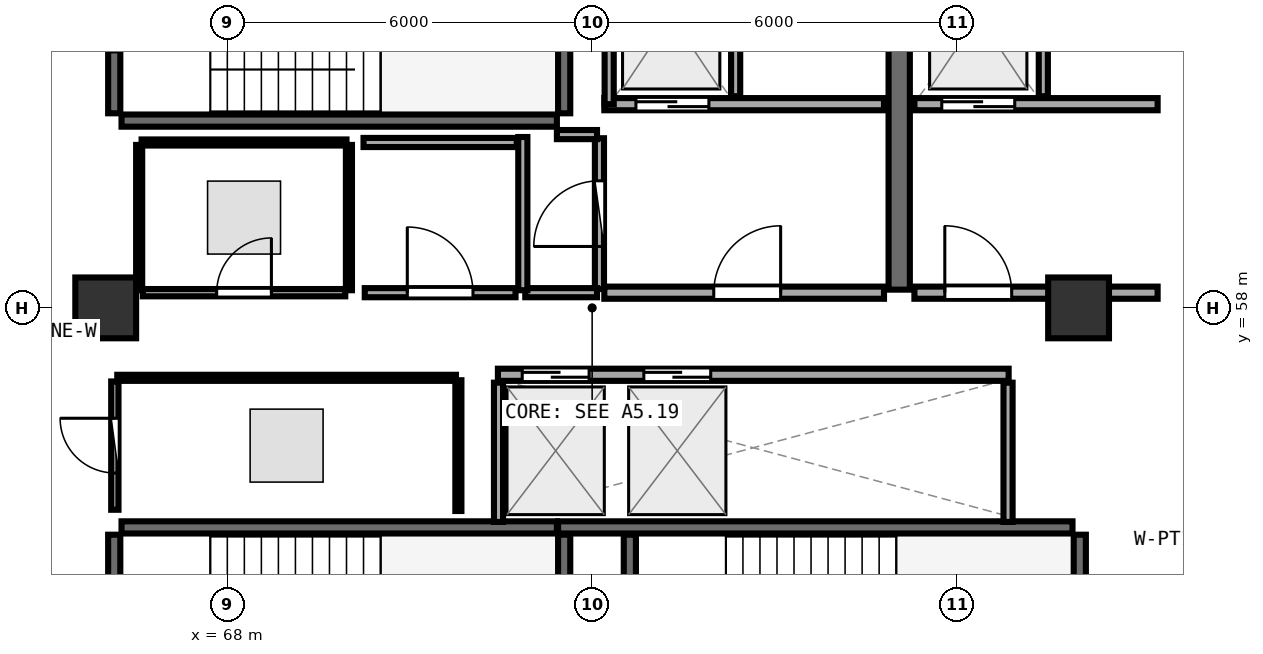
"""IFC4 building model, lengths in metres.
Left out: names, types, materials, properties, quantities, classifications, styles, units other than length and angle.
Written with IfcOpenShell. Run it as: python <this file> out.ifc"""

import sys

from ifc_helpers import new_model, si_unit, direction, frame, frame_2d, origin, origin_2d, place, context, subcontext, project, spatial, rectangle, extrude, element, fill, save


model = new_model("IFC4")
c1 = context("Model", 3, precision=1e-05, world=origin(), true_north=direction((0.0, 1.0)))
c2 = subcontext(c1, "Body", "Model", "MODEL_VIEW")
j1 = project(units=[si_unit("LENGTHUNIT", "METRE"), si_unit("PLANEANGLEUNIT", "RADIAN")], contexts=[c1])
p1 = place(None, origin())
s1 = spatial("IfcSite", under=j1, at=p1, CompositionType="ELEMENT")
p2 = place(p1, origin())
s2 = spatial("IfcBuilding", under=s1, at=p2, CompositionType="ELEMENT")
p3 = place(p2, frame((0.0, 0.0, 278.7)))
s3 = spatial("IfcBuildingStorey", under=s2, at=p3, CompositionType="ELEMENT", Elevation=278.7)
for number, where, z_axis, x_axis in (
    (1, (82.0, 58.0, 0.0), (0.0, 0.0, 1.0), (1.0, 0.0, 0.0)),
    (2, (66.0, 58.0, 0.0), (0.0, 0.0, 1.0), (1.0, 0.0, 0.0)),
):
    element("IfcColumn", number, at=place(p3, frame(where, z_axis=z_axis, x_axis=x_axis)), inside=s3, PredefinedType="PILASTER", context=c2, shape_type="SweptSolid", body=[
        extrude(rectangle(XDim=1.0, YDim=1.0, at=origin_2d()), origin(), (0.0, 0.0, 1.0), 3.75),
    ])
p4 = place(p3, frame((66.26, 61.08, 0.0), z_axis=(0.0, 0.0, 1.0), x_axis=(1.0, 0.0, 0.0)))
e3 = element("IfcWall", 3, at=p4, inside=s3, PredefinedType="SHEAR", context=c2, shape_type="SweptSolid", body=[
    extrude(rectangle(XDim=7.16, YDim=0.2, at=frame_2d((3.58, 0.0))), origin(), (0.0, 0.0, 1.0), 3.49),
])
p5 = place(p3, frame((73.54, 61.2, 0.0), z_axis=(0.0, 0.0, 1.0), x_axis=(0.0, 1.0, 0.0)))
e4 = element("IfcWall", 4, at=p5, inside=s3, PredefinedType="SHEAR", context=c2, shape_type="SweptSolid", body=[
    extrude(rectangle(XDim=3.07, YDim=0.2, at=frame_2d((1.535, 0.0))), origin(), (0.0, 0.0, 1.0), 3.49),
])
p6 = place(p3, frame((66.14, 64.27, 0.0), z_axis=(0.0, 0.0, 1.0), x_axis=(0.0, -1.0, 0.0)))
e5 = element("IfcWall", 5, at=p6, inside=s3, PredefinedType="SHEAR", context=c2, shape_type="SweptSolid", body=[
    extrude(rectangle(XDim=3.07, YDim=0.2, at=frame_2d((1.535, 0.0))), origin(), (0.0, 0.0, 1.0), 3.49),
])
p7 = place(p6, frame((1.01, 0.0, 0.0)))
e6 = element("IfcOpeningElement", 6, at=p7, cuts=e5, PredefinedType="OPENING", context=c2, shape_type="SweptSolid", body=[
    extrude(rectangle(XDim=1.05, YDim=2.1, at=frame_2d((0.525, 1.05))), frame((0.0, 0.11, 0.0), z_axis=(0.0, -1.0, 0.0), x_axis=(1.0, 0.0, 0.0)), (0.0, 0.0, 1.0), 0.22),
])
p8 = place(p3, frame((82.02, 51.2, 0.0), z_axis=(0.0, 0.0, 1.0), x_axis=(0.0, 1.0, 0.0)))
e7 = element("IfcWall", 7, at=p8, inside=s3, PredefinedType="SHEAR", context=c2, shape_type="SweptSolid", body=[
    extrude(rectangle(XDim=3.07, YDim=0.2, at=frame_2d((1.535, 0.0))), origin(), (0.0, 0.0, 1.0), 3.49),
])
p9 = place(p3, frame((81.9, 54.39, 0.0), z_axis=(0.0, 0.0, 1.0), x_axis=(-1.0, 0.0, 0.0)))
e8 = element("IfcWall", 8, at=p9, inside=s3, PredefinedType="SHEAR", context=c2, shape_type="SweptSolid", body=[
    extrude(rectangle(XDim=8.46, YDim=0.2, at=frame_2d((4.23, 0.0))), origin(), (0.0, 0.0, 1.0), 3.49),
])
for number, where, z_axis, x_axis in (
    (9, (74.62, 54.27, 0.0), (0.0, 0.0, 1.0), (0.0, -1.0, 0.0)),
    (10, (73.54, 51.2, 0.0), (0.0, 0.0, 1.0), (0.0, 1.0, 0.0)),
):
    element("IfcWall", number, at=place(p3, frame(where, z_axis=z_axis, x_axis=x_axis)), inside=s3, PredefinedType="SHEAR", context=c2, shape_type="SweptSolid", body=[
        extrude(rectangle(XDim=3.07, YDim=0.2, at=frame_2d((1.535, 0.0))), origin(), (0.0, 0.0, 1.0), 3.49),
    ])
p10 = place(p3, frame((73.42, 54.39, 0.0), z_axis=(0.0, 0.0, 1.0), x_axis=(-1.0, 0.0, 0.0)))
e11 = element("IfcWall", 11, at=p10, inside=s3, PredefinedType="SHEAR", context=c2, shape_type="SweptSolid", body=[
    extrude(rectangle(XDim=7.16, YDim=0.2, at=frame_2d((3.58, 0.0))), origin(), (0.0, 0.0, 1.0), 3.49),
])
p11 = place(p3, frame((66.14, 54.27, 0.0), z_axis=(0.0, 0.0, 1.0), x_axis=(0.0, -1.0, 0.0)))
e12 = element("IfcWall", 12, at=p11, inside=s3, PredefinedType="SHEAR", context=c2, shape_type="SweptSolid", body=[
    extrude(rectangle(XDim=3.07, YDim=0.2, at=frame_2d((1.535, 0.0))), origin(), (0.0, 0.0, 1.0), 3.49),
])
p12 = place(p11, frame((1.01, 0.0, 0.0)))
e13 = element("IfcOpeningElement", 13, at=p12, cuts=e12, PredefinedType="OPENING", context=c2, shape_type="SweptSolid", body=[
    extrude(rectangle(XDim=1.05, YDim=2.1, at=frame_2d((0.525, 1.05))), frame((0.0, 0.11, 0.0), z_axis=(0.0, -1.0, 0.0), x_axis=(1.0, 0.0, 0.0)), (0.0, 0.0, 1.0), 0.22),
])
p13 = place(p3, frame((79.05, 58.3, 0.0), z_axis=(0.0, 0.0, 1.0), x_axis=(0.0, 1.0, 0.0)))
e14 = element("IfcWall", 14, at=p13, inside=s3, PredefinedType="SHEAR", context=c2, shape_type="SweptSolid", body=[
    extrude(rectangle(XDim=6.3, YDim=0.35, at=frame_2d((3.15, 0.0))), origin(), (0.0, 0.0, 1.0), 3.49),
])
p14 = place(p3, frame((74.2, 61.35, 0.0), z_axis=(0.0, 0.0, 1.0), x_axis=(1.0, 0.0, 0.0)))
e15 = element("IfcWall", 15, at=p14, inside=s3, PredefinedType="SOLIDWALL", context=c2, shape_type="SweptSolid", body=[
    extrude(rectangle(XDim=4.6, YDim=0.2, at=frame_2d((2.3, 0.0))), origin(), (0.0, 0.0, 1.0), 3.48),
])
p15 = place(p14, frame((0.52, 0.0, 0.0)))
e16 = element("IfcOpeningElement", 16, at=p15, cuts=e15, PredefinedType="OPENING", context=c2, shape_type="SweptSolid", body=[
    extrude(rectangle(XDim=1.2, YDim=2.15, at=frame_2d((0.6, 1.075))), frame((0.0, 0.11, 0.0), z_axis=(0.0, -1.0, 0.0), x_axis=(1.0, 0.0, 0.0)), (0.0, 0.0, 1.0), 0.22),
])
p16 = place(p3, frame((74.28, 61.35, 0.0), z_axis=(0.0, 0.0, 1.0), x_axis=(0.0, 1.0, 0.0)))
e17 = element("IfcWall", 17, at=p16, inside=s3, PredefinedType="PARTITIONING", context=c2, shape_type="SweptSolid", body=[
    extrude(rectangle(XDim=2.97, YDim=0.15, at=frame_2d((1.485, 0.0))), origin(), (0.0, 0.0, 1.0), 3.48),
])
p17 = place(p3, frame((76.36, 61.48, 0.0), z_axis=(0.0, 0.0, 1.0), x_axis=(0.0, 1.0, 0.0)))
e18 = element("IfcWall", 18, at=p17, inside=s3, PredefinedType="PARTITIONING", context=c2, shape_type="SweptSolid", body=[
    extrude(rectangle(XDim=2.84, YDim=0.15, at=frame_2d((1.42, 0.0))), origin(), (0.0, 0.0, 1.0), 3.48),
])
p18 = place(p3, frame((79.3, 61.35, 0.0), z_axis=(0.0, 0.0, 1.0), x_axis=(1.0, 0.0, 0.0)))
e19 = element("IfcWall", 19, at=p18, inside=s3, PredefinedType="SOLIDWALL", context=c2, shape_type="SweptSolid", body=[
    extrude(rectangle(XDim=4.0, YDim=0.2, at=frame_2d((2.0, 0.0))), origin(), (0.0, 0.0, 1.0), 2.775),
])
p19 = place(p18, frame((0.45, 0.0, 0.0)))
e20 = element("IfcOpeningElement", 20, at=p19, cuts=e19, PredefinedType="OPENING", context=c2, shape_type="SweptSolid", body=[
    extrude(rectangle(XDim=1.2, YDim=2.15, at=frame_2d((0.6, 1.075))), frame((0.0, 0.11, 0.0), z_axis=(0.0, -1.0, 0.0), x_axis=(1.0, 0.0, 0.0)), (0.0, 0.0, 1.0), 0.22),
])
p20 = place(p3, frame((81.42, 61.48, 0.0), z_axis=(0.0, 0.0, 1.0), x_axis=(0.0, 1.0, 0.0)))
e21 = element("IfcWall", 21, at=p20, inside=s3, PredefinedType="PARTITIONING", context=c2, shape_type="SweptSolid", body=[
    extrude(rectangle(XDim=2.84, YDim=0.15, at=frame_2d((1.42, 0.0))), origin(), (0.0, 0.0, 1.0), 3.48),
])
p21 = place(p3, frame((74.2, 58.25, 0.0), z_axis=(0.0, 0.0, 1.0), x_axis=(1.0, 0.0, 0.0)))
e22 = element("IfcWall", 22, at=p21, inside=s3, PredefinedType="SOLIDWALL", context=c2, shape_type="SweptSolid", body=[
    extrude(rectangle(XDim=4.6, YDim=0.2, at=frame_2d((2.3, 0.0))), origin(), (0.0, 0.0, 1.0), 3.48),
])
p22 = place(p21, frame((1.8, 0.0, 0.0)))
e23 = element("IfcOpeningElement", 23, at=p22, cuts=e22, PredefinedType="OPENING", context=c2, shape_type="SweptSolid", body=[
    extrude(rectangle(XDim=1.1, YDim=2.1, at=frame_2d((0.55, 1.05))), frame((0.0, 0.11, 0.0), z_axis=(0.0, -1.0, 0.0), x_axis=(1.0, 0.0, 0.0)), (0.0, 0.0, 1.0), 0.22),
])
p23 = place(p3, frame((79.3, 58.25, 0.0), z_axis=(0.0, 0.0, 1.0), x_axis=(1.0, 0.0, 0.0)))
e24 = element("IfcWall", 24, at=p23, inside=s3, PredefinedType="SOLIDWALL", context=c2, shape_type="SweptSolid", body=[
    extrude(rectangle(XDim=4.0, YDim=0.2, at=frame_2d((2.0, 0.0))), origin(), (0.0, 0.0, 1.0), 2.775),
])
p24 = place(p23, frame((0.5, 0.0, 0.0)))
e25 = element("IfcOpeningElement", 25, at=p24, cuts=e24, PredefinedType="OPENING", context=c2, shape_type="SweptSolid", body=[
    extrude(rectangle(XDim=1.1, YDim=2.1, at=frame_2d((0.55, 1.05))), frame((0.0, 0.11, 0.0), z_axis=(0.0, -1.0, 0.0), x_axis=(1.0, 0.0, 0.0)), (0.0, 0.0, 1.0), 0.22),
])
p25 = place(p3, frame((72.45, 56.9, 0.0), z_axis=(0.0, 0.0, 1.0), x_axis=(1.0, 0.0, 0.0)))
e26 = element("IfcWall", 26, at=p25, inside=s3, PredefinedType="SOLIDWALL", context=c2, shape_type="SweptSolid", body=[
    extrude(rectangle(XDim=8.4, YDim=0.2, at=frame_2d((4.2, 0.0))), origin(), (0.0, 0.0, 1.0), 3.48),
])
p26 = place(p25, frame((0.4, 0.0, 0.0)))
e27 = element("IfcOpeningElement", 27, at=p26, cuts=e26, PredefinedType="OPENING", context=c2, shape_type="SweptSolid", body=[
    extrude(rectangle(XDim=1.1, YDim=2.1, at=frame_2d((0.55, 1.05))), frame((0.0, 0.11, 0.0), z_axis=(0.0, -1.0, 0.0), x_axis=(1.0, 0.0, 0.0)), (0.0, 0.0, 1.0), 0.22),
])
p27 = place(p25, frame((2.4, 0.0, 0.0)))
e28 = element("IfcOpeningElement", 28, at=p27, cuts=e26, PredefinedType="OPENING", context=c2, shape_type="SweptSolid", body=[
    extrude(rectangle(XDim=1.1, YDim=2.1, at=frame_2d((0.55, 1.05))), frame((0.0, 0.11, 0.0), z_axis=(0.0, -1.0, 0.0), x_axis=(1.0, 0.0, 0.0)), (0.0, 0.0, 1.0), 0.22),
])
for number, where, z_axis, x_axis in (
    (29, (72.46, 54.48, 0.0), (0.0, 0.0, 1.0), (0.0, 1.0, 0.0)),
    (30, (80.84, 54.48, 0.0), (0.0, 0.0, 1.0), (0.0, 1.0, 0.0)),
):
    element("IfcWall", number, at=place(p3, frame(where, z_axis=z_axis, x_axis=x_axis)), inside=s3, PredefinedType="PARTITIONING", context=c2, shape_type="SweptSolid", body=[
        extrude(rectangle(XDim=2.29, YDim=0.15, at=frame_2d((1.145, 0.0))), origin(), (0.0, 0.0, 1.0), 3.48),
    ])
p28 = place(p3, frame((74.12, 58.31, 0.0), z_axis=(0.0, 0.0, 1.0), x_axis=(0.0, 1.0, 0.0)))
e31 = element("IfcWall", 31, at=p28, inside=s3, PredefinedType="PARTITIONING", context=c2, shape_type="SweptSolid", body=[
    extrude(rectangle(XDim=2.48, YDim=0.15, at=frame_2d((1.24, 0.0))), origin(), (0.0, 0.0, 1.0), 3.48),
])
p29 = place(p28, frame((0.7, 0.0, 0.0)))
e32 = element("IfcOpeningElement", 32, at=p29, cuts=e31, PredefinedType="OPENING", context=c2, shape_type="SweptSolid", body=[
    extrude(rectangle(XDim=1.08, YDim=2.1, at=frame_2d((0.54, 1.05))), frame((0.0, 0.085, 0.0), z_axis=(0.0, -1.0, 0.0), x_axis=(1.0, 0.0, 0.0)), (0.0, 0.0, 1.0), 0.17),
])
p30 = place(p3, frame((66.61, 58.25, 0.0), z_axis=(0.0, 0.0, 1.0), x_axis=(1.0, 0.0, 0.0)))
e33 = element("IfcWall", 33, at=p30, inside=s3, PredefinedType="PARTITIONING", context=c2, shape_type="SweptSolid", body=[
    extrude(rectangle(XDim=3.33, YDim=0.12, at=frame_2d((1.665, 0.0))), origin(), (0.0, 0.0, 1.0), 3.48),
])
p31 = place(p30, frame((1.215, 0.0, 0.0)))
e34 = element("IfcOpeningElement", 34, at=p31, cuts=e33, PredefinedType="OPENING", context=c2, shape_type="SweptSolid", body=[
    extrude(rectangle(XDim=0.9, YDim=2.08, at=frame_2d((0.45, 1.04))), frame((0.0, 0.07, 0.0), z_axis=(0.0, -1.0, 0.0), x_axis=(1.0, 0.0, 0.0)), (0.0, 0.0, 1.0), 0.14),
])
p32 = place(p3, frame((70.26, 58.25, 0.0), z_axis=(0.0, 0.0, 1.0), x_axis=(1.0, 0.0, 0.0)))
e35 = element("IfcWall", 35, at=p32, inside=s3, PredefinedType="PARTITIONING", context=c2, shape_type="SweptSolid", body=[
    extrude(rectangle(XDim=2.48, YDim=0.15, at=frame_2d((1.24, 0.0))), origin(), (0.0, 0.0, 1.0), 3.48),
])
p33 = place(p32, frame((0.7, 0.0, 0.0)))
e36 = element("IfcOpeningElement", 36, at=p33, cuts=e35, PredefinedType="OPENING", context=c2, shape_type="SweptSolid", body=[
    extrude(rectangle(XDim=1.08, YDim=2.1, at=frame_2d((0.54, 1.05))), frame((0.0, 0.085, 0.0), z_axis=(0.0, -1.0, 0.0), x_axis=(1.0, 0.0, 0.0)), (0.0, 0.0, 1.0), 0.17),
])
p34 = place(p3, frame((66.15, 54.68, 0.0), z_axis=(0.0, 0.0, 1.0), x_axis=(0.0, 1.0, 0.0)))
e37 = element("IfcWall", 37, at=p34, inside=s3, PredefinedType="PARTITIONING", context=c2, shape_type="SweptSolid", body=[
    extrude(rectangle(XDim=2.11, YDim=0.12, at=frame_2d((1.055, 0.0))), origin(), (0.0, 0.0, 1.0), 2.775),
])
p35 = place(p34, frame((0.605, 0.0, 0.0)))
e38 = element("IfcOpeningElement", 38, at=p35, cuts=e37, PredefinedType="OPENING", context=c2, shape_type="SweptSolid", body=[
    extrude(rectangle(XDim=0.9, YDim=2.08, at=frame_2d((0.45, 1.04))), frame((0.0, 0.07, 0.0), z_axis=(0.0, -1.0, 0.0), x_axis=(1.0, 0.0, 0.0)), (0.0, 0.0, 1.0), 0.14),
])
p36 = place(p3, frame((72.9, 58.25, 0.0), z_axis=(0.0, 0.0, 1.0), x_axis=(1.0, 0.0, 0.0)))
e39 = element("IfcWall", 39, at=p36, inside=s3, PredefinedType="PARTITIONING", context=c2, shape_type="SweptSolid", body=[
    extrude(rectangle(XDim=1.18, YDim=0.15, at=frame_2d((0.59, 0.0))), origin(), (0.0, 0.0, 1.0), 3.48),
])
p37 = place(p3, frame((74.08, 60.85, 0.0), z_axis=(0.0, 0.0, 1.0), x_axis=(-1.0, 0.0, 0.0)))
e40 = element("IfcWall", 40, at=p37, inside=s3, PredefinedType="PARTITIONING", context=c2, shape_type="SweptSolid", body=[
    extrude(rectangle(XDim=0.66, YDim=0.15, at=frame_2d((0.33, 0.0))), origin(), (0.0, 0.0, 1.0), 3.48),
])
p38 = place(p3, frame((72.86, 60.81, 0.0), z_axis=(0.0, 0.0, 1.0), x_axis=(0.0, -1.0, 0.0)))
e41 = element("IfcWall", 41, at=p38, inside=s3, PredefinedType="PARTITIONING", context=c2, shape_type="SweptSolid", body=[
    extrude(rectangle(XDim=2.52, YDim=0.15, at=frame_2d((1.26, 0.0))), origin(), (0.0, 0.0, 1.0), 3.48),
])
p39 = place(p3, frame((70.0, 58.29, 0.0), z_axis=(0.0, 0.0, 1.0), x_axis=(0.0, 1.0, 0.0)))
e42 = element("IfcWall", 42, at=p39, inside=s3, PredefinedType="PARTITIONING", context=c2, shape_type="SweptSolid", body=[
    extrude(rectangle(XDim=2.39, YDim=0.1, at=frame_2d((1.195, 0.0))), origin(), (0.0, 0.0, 1.0), 3.48),
])
p40 = place(p3, frame((69.96, 60.72, 0.0), z_axis=(0.0, 0.0, 1.0), x_axis=(-1.0, 0.0, 0.0)))
e43 = element("IfcWall", 43, at=p40, inside=s3, PredefinedType="PARTITIONING", context=c2, shape_type="SweptSolid", body=[
    extrude(rectangle(XDim=3.37, YDim=0.1, at=frame_2d((1.685, 0.0))), origin(), (0.0, 0.0, 1.0), 3.48),
])
p41 = place(p3, frame((66.55, 60.68, 0.0), z_axis=(0.0, 0.0, 1.0), x_axis=(0.0, -1.0, 0.0)))
e44 = element("IfcWall", 44, at=p41, inside=s3, PredefinedType="PARTITIONING", context=c2, shape_type="SweptSolid", body=[
    extrude(rectangle(XDim=2.39, YDim=0.1, at=frame_2d((1.195, 0.0))), origin(), (0.0, 0.0, 1.0), 3.48),
])
p42 = place(p3, frame((72.76, 60.72, 0.0), z_axis=(0.0, 0.0, 1.0), x_axis=(-1.0, 0.0, 0.0)))
e45 = element("IfcWall", 45, at=p42, inside=s3, PredefinedType="PARTITIONING", context=c2, shape_type="SweptSolid", body=[
    extrude(rectangle(XDim=2.52, YDim=0.15, at=frame_2d((1.26, 0.0))), origin(), (0.0, 0.0, 1.0), 3.48),
])
p43 = place(p3, frame((71.8, 54.66, 0.0), z_axis=(0.0, 0.0, 1.0), x_axis=(0.0, 1.0, 0.0)))
e46 = element("IfcWall", 46, at=p43, inside=s3, PredefinedType="PARTITIONING", context=c2, shape_type="SweptSolid", body=[
    extrude(rectangle(XDim=2.15, YDim=0.1, at=frame_2d((1.075, 0.0))), origin(), (0.0, 0.0, 1.0), 3.48),
])
p44 = place(p3, frame((71.76, 56.85, 0.0), z_axis=(0.0, 0.0, 1.0), x_axis=(-1.0, 0.0, 0.0)))
e47 = element("IfcWall", 47, at=p44, inside=s3, PredefinedType="PARTITIONING", context=c2, shape_type="SweptSolid", body=[
    extrude(rectangle(XDim=5.57, YDim=0.1, at=frame_2d((2.785, 0.0))), origin(), (0.0, 0.0, 1.0), 2.775),
])
p45 = place(p15, origin())
e48 = element("IfcDoor", 48, at=p45, inside=s3, OperationType="DOUBLE_DOOR_SLIDING", PredefinedType="DOOR", context=c2, shape_type="SweptSolid", body=[
    extrude(rectangle(XDim=1.2, YDim=2.15, at=frame_2d((0.6, 1.075))), frame((0.0, 0.025, 0.0), z_axis=(0.0, -1.0, 0.0), x_axis=(1.0, 0.0, 0.0)), (0.0, 0.0, 1.0), 0.05),
])
fill(e16, e48)
p46 = place(p19, origin())
e49 = element("IfcDoor", 49, at=p46, inside=s3, OperationType="DOUBLE_DOOR_SLIDING", PredefinedType="DOOR", context=c2, shape_type="SweptSolid", body=[
    extrude(rectangle(XDim=1.2, YDim=2.15, at=frame_2d((0.6, 1.075))), frame((0.0, 0.025, 0.0), z_axis=(0.0, -1.0, 0.0), x_axis=(1.0, 0.0, 0.0)), (0.0, 0.0, 1.0), 0.05),
])
fill(e20, e49)
p47 = place(p22, frame((1.1, 0.0, 0.0), z_axis=(0.0, 0.0, 1.0), x_axis=(-1.0, 0.0, 0.0)))
e50 = element("IfcDoor", 50, at=p47, inside=s3, OperationType="SINGLE_SWING_LEFT", PredefinedType="DOOR", context=c2, shape_type="SweptSolid", body=[
    extrude(rectangle(XDim=1.1, YDim=2.1, at=frame_2d((0.55, 1.05))), frame((0.0, 0.025, 0.0), z_axis=(0.0, -1.0, 0.0), x_axis=(1.0, 0.0, 0.0)), (0.0, 0.0, 1.0), 0.05),
])
fill(e23, e50)
p48 = place(p24, frame((1.1, 0.0, 0.0), z_axis=(0.0, 0.0, 1.0), x_axis=(-1.0, 0.0, 0.0)))
e51 = element("IfcDoor", 51, at=p48, inside=s3, OperationType="SINGLE_SWING_RIGHT", PredefinedType="DOOR", context=c2, shape_type="SweptSolid", body=[
    extrude(rectangle(XDim=1.1, YDim=2.1, at=frame_2d((0.55, 1.05))), frame((0.0, 0.025, 0.0), z_axis=(0.0, -1.0, 0.0), x_axis=(1.0, 0.0, 0.0)), (0.0, 0.0, 1.0), 0.05),
])
fill(e25, e51)
p49 = place(p26, origin())
e52 = element("IfcDoor", 52, at=p49, inside=s3, OperationType="DOUBLE_DOOR_SLIDING", PredefinedType="DOOR", context=c2, shape_type="SweptSolid", body=[
    extrude(rectangle(XDim=1.1, YDim=2.1, at=frame_2d((0.55, 1.05))), frame((0.0, 0.025, 0.0), z_axis=(0.0, -1.0, 0.0), x_axis=(1.0, 0.0, 0.0)), (0.0, 0.0, 1.0), 0.05),
])
fill(e27, e52)
p50 = place(p27, origin())
e53 = element("IfcDoor", 53, at=p50, inside=s3, OperationType="DOUBLE_DOOR_SLIDING", PredefinedType="DOOR", context=c2, shape_type="SweptSolid", body=[
    extrude(rectangle(XDim=1.1, YDim=2.1, at=frame_2d((0.55, 1.05))), frame((0.0, 0.025, 0.0), z_axis=(0.0, -1.0, 0.0), x_axis=(1.0, 0.0, 0.0)), (0.0, 0.0, 1.0), 0.05),
])
fill(e28, e53)
p51 = place(p29, origin())
e54 = element("IfcDoor", 54, at=p51, inside=s3, OperationType="SINGLE_SWING_LEFT", PredefinedType="DOOR", context=c2, shape_type="SweptSolid", body=[
    extrude(rectangle(XDim=1.08, YDim=2.1, at=frame_2d((0.54, 1.05))), frame((0.0, 0.025, 0.0), z_axis=(0.0, -1.0, 0.0), x_axis=(1.0, 0.0, 0.0)), (0.0, 0.0, 1.0), 0.05),
])
fill(e32, e54)
p52 = place(p31, origin())
e55 = element("IfcDoor", 55, at=p52, inside=s3, OperationType="SINGLE_SWING_RIGHT", PredefinedType="DOOR", context=c2, shape_type="SweptSolid", body=[
    extrude(rectangle(XDim=0.9, YDim=2.08, at=frame_2d((0.45, 1.04))), frame((0.0, 0.025, 0.0), z_axis=(0.0, -1.0, 0.0), x_axis=(1.0, 0.0, 0.0)), (0.0, 0.0, 1.0), 0.05),
])
fill(e34, e55)
p53 = place(p33, origin())
e56 = element("IfcDoor", 56, at=p53, inside=s3, OperationType="SINGLE_SWING_LEFT", PredefinedType="DOOR", context=c2, shape_type="SweptSolid", body=[
    extrude(rectangle(XDim=1.08, YDim=2.1, at=frame_2d((0.54, 1.05))), frame((0.0, 0.025, 0.0), z_axis=(0.0, -1.0, 0.0), x_axis=(1.0, 0.0, 0.0)), (0.0, 0.0, 1.0), 0.05),
])
fill(e36, e56)
p54 = place(p35, origin())
e57 = element("IfcDoor", 57, at=p54, inside=s3, OperationType="SINGLE_SWING_RIGHT", PredefinedType="DOOR", context=c2, shape_type="SweptSolid", body=[
    extrude(rectangle(XDim=0.9, YDim=2.08, at=frame_2d((0.45, 1.04))), frame((0.0, 0.025, 0.0), z_axis=(0.0, -1.0, 0.0), x_axis=(1.0, 0.0, 0.0)), (0.0, 0.0, 1.0), 0.05),
])
fill(e38, e57)
save(model, sys.argv[1])
